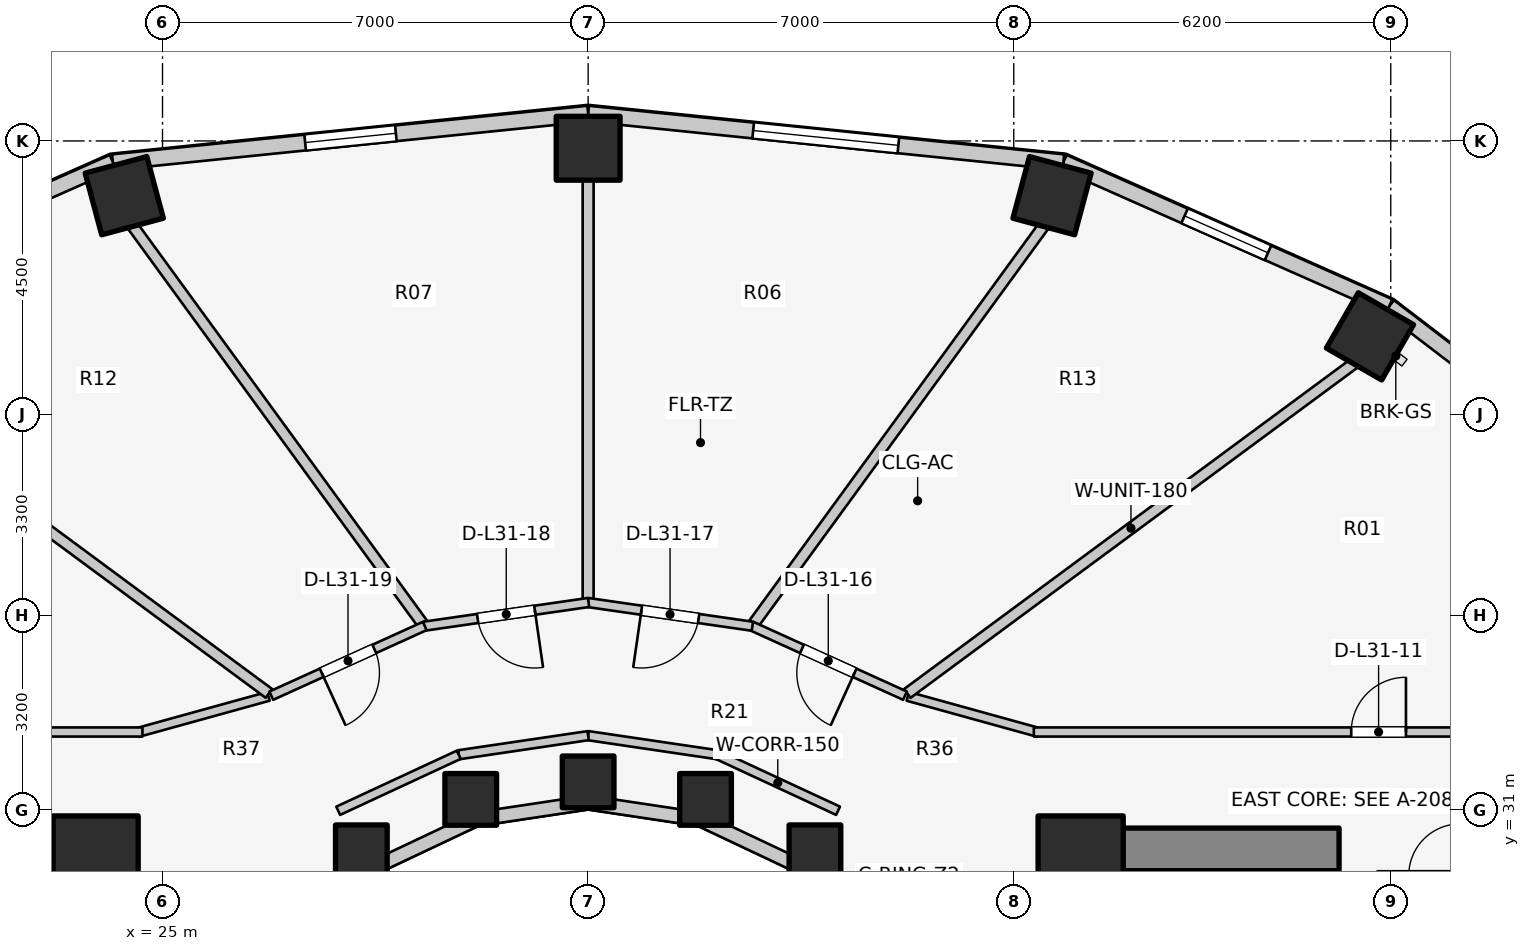
"""IFC4 building model, lengths in metres.
Left out: names, types, materials, properties, quantities, classifications, styles, units other than length and angle.
Written with IfcOpenShell. Run it as: python <this file> out.ifc"""

import sys

from ifc_helpers import new_model, si_unit, direction, frame, frame_2d, origin, origin_2d, place, context, subcontext, project, spatial, rectangle, extrude, element, fill, save


model = new_model("IFC4")
c1 = context("Model", 3, precision=1e-05, world=origin(), true_north=direction((0.0, 1.0)))
c2 = subcontext(c1, "Body", "Model", "MODEL_VIEW")
j1 = project(units=[si_unit("LENGTHUNIT", "METRE"), si_unit("PLANEANGLEUNIT", "RADIAN")], contexts=[c1])
p1 = place(None, origin())
s1 = spatial("IfcSite", under=j1, at=p1, CompositionType="ELEMENT")
p2 = place(p1, origin())
s2 = spatial("IfcBuilding", under=s1, at=p2, CompositionType="ELEMENT")
p3 = place(p2, frame((0.0, 0.0, 104.2)))
s3 = spatial("IfcBuildingStorey", under=s2, at=p3, CompositionType="ELEMENT", Elevation=104.2)
for number, where, z_axis, x_axis in (
    (1, (19.65, 30.35, 0.0), (0.0, 0.0, 1.0), (1.0, 0.0, 0.0)),
    (2, (39.85, 30.35, 0.0), (0.0, 0.0, 1.0), (1.0, 0.0, 0.0)),
):
    element("IfcWall", number, at=place(p3, frame(where, z_axis=z_axis, x_axis=x_axis)), inside=s3, PredefinedType="SHEAR", context=c2, shape_type="SweptSolid", body=[
        extrude(rectangle(XDim=4.5, YDim=0.7, at=frame_2d((2.25, 0.0))), origin(), (0.0, 0.0, 1.0), 3.1),
    ])
for number, where, z_axis, x_axis in (
    (3, (23.9, 30.2, 0.0), (0.0, 0.0, 1.0), (1.0, 0.0, 0.0)),
    (4, (40.1, 30.2, 0.0), (0.0, 0.0, 1.0), (1.0, 0.0, 0.0)),
):
    element("IfcColumn", number, at=place(p3, frame(where, z_axis=z_axis, x_axis=x_axis)), inside=s3, PredefinedType="COLUMN", context=c2, shape_type="SweptSolid", body=[
        extrude(rectangle(XDim=1.4, YDim=1.4, at=origin_2d()), origin(), (0.0, 0.0, 1.0), 3.1),
    ])
p4 = place(p3, frame((35.73, 30.327, 0.0), z_axis=(0.0, 0.0, 1.0), x_axis=(1.0, 0.0, 0.0)))
e5 = element("IfcColumn", 5, at=p4, inside=s3, PredefinedType="COLUMN", context=c2, shape_type="SweptSolid", body=[
    extrude(rectangle(XDim=0.85, YDim=0.85, at=origin_2d()), origin(), (0.0, 0.0, 1.0), 3.1),
])
p5 = place(p3, frame((44.858, 38.786, 0.0), z_axis=(0.0, 0.0, 1.0), x_axis=(0.5, 0.866025403784, 0.0)))
e6 = element("IfcColumn", 6, at=p5, inside=s3, PredefinedType="COLUMN", context=c2, shape_type="SweptSolid", body=[
    extrude(rectangle(XDim=1.05, YDim=1.05, at=origin_2d()), origin(), (0.0, 0.0, 1.0), 3.1),
])
p6 = place(p3, frame((33.931, 31.172, 0.0), z_axis=(0.0, 0.0, 1.0), x_axis=(1.0, 0.0, 0.0)))
e7 = element("IfcColumn", 7, at=p6, inside=s3, PredefinedType="COLUMN", context=c2, shape_type="SweptSolid", body=[
    extrude(rectangle(XDim=0.85, YDim=0.85, at=origin_2d()), origin(), (0.0, 0.0, 1.0), 3.1),
])
p7 = place(p3, frame((39.629, 41.1, 0.0), z_axis=(0.0, 0.0, 1.0), x_axis=(0.258819045103, 0.965925826289, 0.0)))
e8 = element("IfcColumn", 8, at=p7, inside=s3, PredefinedType="COLUMN", context=c2, shape_type="SweptSolid", body=[
    extrude(rectangle(XDim=1.05, YDim=1.05, at=origin_2d()), origin(), (0.0, 0.0, 1.0), 3.1),
])
p8 = place(p3, frame((32.0, 31.46, 0.0), z_axis=(0.0, 0.0, 1.0), x_axis=(1.0, 0.0, 0.0)))
e9 = element("IfcColumn", 9, at=p8, inside=s3, PredefinedType="COLUMN", context=c2, shape_type="SweptSolid", body=[
    extrude(rectangle(XDim=0.85, YDim=0.85, at=origin_2d()), origin(), (0.0, 0.0, 1.0), 3.1),
])
p9 = place(p3, frame((32.0, 41.88, 0.0), z_axis=(0.0, 0.0, 1.0), x_axis=(0.0, 1.0, 0.0)))
e10 = element("IfcColumn", 10, at=p9, inside=s3, PredefinedType="COLUMN", context=c2, shape_type="SweptSolid", body=[
    extrude(rectangle(XDim=1.05, YDim=1.05, at=origin_2d()), origin(), (0.0, 0.0, 1.0), 3.1),
])
p10 = place(p3, frame((30.069, 31.172, 0.0), z_axis=(0.0, 0.0, 1.0), x_axis=(1.0, 0.0, 0.0)))
e11 = element("IfcColumn", 11, at=p10, inside=s3, PredefinedType="COLUMN", context=c2, shape_type="SweptSolid", body=[
    extrude(rectangle(XDim=0.85, YDim=0.85, at=origin_2d()), origin(), (0.0, 0.0, 1.0), 3.1),
])
p11 = place(p3, frame((24.371, 41.1, 0.0), z_axis=(0.0, 0.0, 1.0), x_axis=(-0.258819045103, 0.965925826289, 0.0)))
e12 = element("IfcColumn", 12, at=p11, inside=s3, PredefinedType="COLUMN", context=c2, shape_type="SweptSolid", body=[
    extrude(rectangle(XDim=1.05, YDim=1.05, at=origin_2d()), origin(), (0.0, 0.0, 1.0), 3.1),
])
p12 = place(p3, frame((28.27, 30.327, 0.0), z_axis=(0.0, 0.0, 1.0), x_axis=(1.0, 0.0, 0.0)))
e13 = element("IfcColumn", 13, at=p12, inside=s3, PredefinedType="COLUMN", context=c2, shape_type="SweptSolid", body=[
    extrude(rectangle(XDim=0.85, YDim=0.85, at=origin_2d()), origin(), (0.0, 0.0, 1.0), 3.1),
])
p13 = place(p3, frame((37.035, 28.742, 0.0), z_axis=(0.0, 0.0, 1.0), x_axis=(-0.752576694707, 0.658504607869, 0.0)))
e14 = element("IfcWall", 14, at=p13, inside=s3, PredefinedType="STANDARD", context=c2, shape_type="SweptSolid", body=[
    extrude(rectangle(XDim=1.959, YDim=0.23, at=frame_2d((0.98, 0.0))), origin(), (0.0, 0.0, 1.0), 2.16),
])
p14 = place(p3, frame((35.56, 30.032, 0.0), z_axis=(0.0, 0.0, 1.0), x_axis=(-0.904179699603, 0.427152280606, 0.0)))
e15 = element("IfcWall", 15, at=p14, inside=s3, PredefinedType="STANDARD", context=c2, shape_type="SweptSolid", body=[
    extrude(rectangle(XDim=1.899, YDim=0.23, at=frame_2d((0.95, 0.0))), origin(), (0.0, 0.0, 1.0), 2.16),
])
for number, where, z_axis, x_axis in (
    (16, (33.843, 30.843, 0.0), (0.0, 0.0, 1.0), (-0.989, 0.149, 0.0)),
    (17, (32.0, 31.12, 0.0), (0.0, 0.0, 1.0), (-0.989, -0.149, 0.0)),
):
    element("IfcWall", number, at=place(p3, frame(where, z_axis=z_axis, x_axis=x_axis)), inside=s3, PredefinedType="STANDARD", context=c2, shape_type="SweptSolid", body=[
        extrude(rectangle(XDim=1.864, YDim=0.23, at=frame_2d((0.932, 0.0))), origin(), (0.0, 0.0, 1.0), 2.16),
    ])
p15 = place(p3, frame((30.157, 30.843, 0.0), z_axis=(0.0, 0.0, 1.0), x_axis=(-0.904179699603, -0.427152280606, 0.0)))
e18 = element("IfcWall", 18, at=p15, inside=s3, PredefinedType="STANDARD", context=c2, shape_type="SweptSolid", body=[
    extrude(rectangle(XDim=1.899, YDim=0.23, at=frame_2d((0.95, 0.0))), origin(), (0.0, 0.0, 1.0), 2.16),
])
p16 = place(p3, frame((28.44, 30.032, 0.0), z_axis=(0.0, 0.0, 1.0), x_axis=(-0.752576694707, -0.658504607869, 0.0)))
e19 = element("IfcWall", 19, at=p16, inside=s3, PredefinedType="STANDARD", context=c2, shape_type="SweptSolid", body=[
    extrude(rectangle(XDim=1.959, YDim=0.23, at=frame_2d((0.98, 0.0))), origin(), (0.0, 0.0, 1.0), 2.16),
])
p17 = place(p3, frame((49.266, 36.153, 0.0), z_axis=(0.0, 0.0, 1.0), x_axis=(-0.794809810864, 0.606858603427, 0.0)))
e20 = element("IfcWall", 20, at=p17, inside=s3, PredefinedType="STANDARD", context=c2, shape_type="SweptSolid", body=[
    extrude(rectangle(XDim=5.149, YDim=0.26, at=frame_2d((2.575, 0.0))), origin(), (0.0, 0.0, 1.0), 2.85),
])
p18 = place(p3, frame((45.173, 39.278, 0.0), z_axis=(0.0, 0.0, 1.0), x_axis=(-0.914336605747, 0.404955023911, 0.0)))
e21 = element("IfcWall", 21, at=p18, inside=s3, PredefinedType="STANDARD", context=c2, shape_type="SweptSolid", body=[
    extrude(rectangle(XDim=5.859, YDim=0.26, at=frame_2d((2.929, 0.0))), origin(), (0.0, 0.0, 1.0), 2.85),
])
p19 = place(p18, frame((2.179, 0.0, 0.75)))
e22 = element("IfcOpeningElement", 22, at=p19, cuts=e21, PredefinedType="OPENING", context=c2, shape_type="SweptSolid", body=[
    extrude(rectangle(XDim=1.5, YDim=1.6, at=frame_2d((0.75, 0.8))), frame((0.0, 0.14, 0.0), z_axis=(0.0, -1.0, 0.0), x_axis=(1.0, 0.0, 0.0)), (0.0, 0.0, 1.0), 0.28),
])
p20 = place(p3, frame((39.816, 41.651, 0.0), z_axis=(0.0, 0.0, 1.0), x_axis=(-0.994821390558, 0.101638579726, 0.0)))
e23 = element("IfcWall", 23, at=p20, inside=s3, PredefinedType="STANDARD", context=c2, shape_type="SweptSolid", body=[
    extrude(rectangle(XDim=7.857, YDim=0.26, at=frame_2d((3.929, 0.0))), origin(), (0.0, 0.0, 1.0), 2.85),
])
p21 = place(p20, frame((2.729, 0.0, 0.75)))
e24 = element("IfcOpeningElement", 24, at=p21, cuts=e23, PredefinedType="OPENING", context=c2, shape_type="SweptSolid", body=[
    extrude(rectangle(XDim=2.4, YDim=1.7, at=frame_2d((1.2, 0.85))), frame((0.0, 0.14, 0.0), z_axis=(0.0, -1.0, 0.0), x_axis=(1.0, 0.0, 0.0)), (0.0, 0.0, 1.0), 0.28),
])
p22 = place(p3, frame((32.0, 42.449, 0.0), z_axis=(0.0, 0.0, 1.0), x_axis=(-0.994821390558, -0.101638579726, 0.0)))
e25 = element("IfcWall", 25, at=p22, inside=s3, PredefinedType="STANDARD", context=c2, shape_type="SweptSolid", body=[
    extrude(rectangle(XDim=7.857, YDim=0.26, at=frame_2d((3.929, 0.0))), origin(), (0.0, 0.0, 1.0), 2.85),
])
p23 = place(p22, frame((3.178, 0.0, 0.75)))
e26 = element("IfcOpeningElement", 26, at=p23, cuts=e25, PredefinedType="OPENING", context=c2, shape_type="SweptSolid", body=[
    extrude(rectangle(XDim=1.5, YDim=1.6, at=frame_2d((0.75, 0.8))), frame((0.0, 0.14, 0.0), z_axis=(0.0, -1.0, 0.0), x_axis=(1.0, 0.0, 0.0)), (0.0, 0.0, 1.0), 0.28),
])
p24 = place(p3, frame((24.184, 41.651, 0.0), z_axis=(0.0, 0.0, 1.0), x_axis=(-0.914336605747, -0.404955023911, 0.0)))
e27 = element("IfcWall", 27, at=p24, inside=s3, PredefinedType="STANDARD", context=c2, shape_type="SweptSolid", body=[
    extrude(rectangle(XDim=5.859, YDim=0.26, at=frame_2d((2.929, 0.0))), origin(), (0.0, 0.0, 1.0), 2.85),
])
p25 = place(p24, frame((2.179, 0.0, 0.75)))
e28 = element("IfcOpeningElement", 28, at=p25, cuts=e27, PredefinedType="OPENING", context=c2, shape_type="SweptSolid", body=[
    extrude(rectangle(XDim=1.5, YDim=1.6, at=frame_2d((0.75, 0.8))), frame((0.0, 0.14, 0.0), z_axis=(0.0, -1.0, 0.0), x_axis=(1.0, 0.0, 0.0)), (0.0, 0.0, 1.0), 0.28),
])
p26 = place(p3, frame((36.11, 30.985, 0.0), z_axis=(0.0, 0.0, 1.0), x_axis=(-0.906943449489, 0.421252393975, 0.0)))
e29 = element("IfcWall", 29, at=p26, inside=s3, PredefinedType="PARTITIONING", context=c2, shape_type="SweptSolid", body=[
    extrude(rectangle(XDim=2.186, YDim=0.15, at=frame_2d((1.093, 0.0))), origin(), (0.0, 0.0, 1.0), 2.272),
])
for number, where, z_axis, x_axis in (
    (30, (34.127, 31.906, 0.0), (0.0, 0.0, 1.0), (-0.989, 0.146, 0.0)),
    (31, (32.0, 32.22, 0.0), (0.0, 0.0, 1.0), (-0.989, -0.146, 0.0)),
):
    element("IfcWall", number, at=place(p3, frame(where, z_axis=z_axis, x_axis=x_axis)), inside=s3, PredefinedType="PARTITIONING", context=c2, shape_type="SweptSolid", body=[
        extrude(rectangle(XDim=2.151, YDim=0.15, at=frame_2d((1.075, 0.0))), origin(), (0.0, 0.0, 1.0), 2.272),
    ])
p27 = place(p3, frame((29.873, 31.906, 0.0), z_axis=(0.0, 0.0, 1.0), x_axis=(-0.906943449489, -0.421252393975, 0.0)))
e32 = element("IfcWall", 32, at=p27, inside=s3, PredefinedType="PARTITIONING", context=c2, shape_type="SweptSolid", body=[
    extrude(rectangle(XDim=2.186, YDim=0.15, at=frame_2d((1.093, 0.0))), origin(), (0.0, 0.0, 1.0), 2.272),
])
p28 = place(p3, frame((37.258, 32.867, 0.0), z_axis=(0.0, 0.0, 1.0), x_axis=(0.963833843713, -0.266503886865, 0.0)))
e33 = element("IfcWall", 33, at=p28, inside=s3, PredefinedType="PARTITIONING", context=c2, shape_type="SweptSolid", body=[
    extrude(rectangle(XDim=2.232, YDim=0.15, at=frame_2d((1.116, 0.0))), origin(), (0.0, 0.0, 1.0), 2.272),
])
p29 = place(p3, frame((39.33, 32.28, 0.0), z_axis=(0.0, 0.0, 1.0), x_axis=(1.0, 0.0, 0.0)))
e34 = element("IfcWall", 34, at=p29, inside=s3, PredefinedType="PARTITIONING", context=c2, shape_type="SweptSolid", body=[
    extrude(rectangle(XDim=7.52, YDim=0.15, at=frame_2d((3.76, 0.0))), origin(), (0.0, 0.0, 1.0), 2.272),
])
p30 = place(p29, frame((5.22, 0.0, 0.0)))
e35 = element("IfcOpeningElement", 35, at=p30, cuts=e34, PredefinedType="OPENING", context=c2, shape_type="SweptSolid", body=[
    extrude(rectangle(XDim=0.9, YDim=2.1, at=frame_2d((0.45, 1.05))), frame((0.0, 0.085, 0.0), z_axis=(0.0, -1.0, 0.0), x_axis=(1.0, 0.0, 0.0)), (0.0, 0.0, 1.0), 0.17),
])
p31 = place(p3, frame((26.742, 32.867, 0.0), z_axis=(0.0, 0.0, 1.0), x_axis=(-0.963833843713, -0.266503886865, 0.0)))
e36 = element("IfcWall", 36, at=p31, inside=s3, PredefinedType="PARTITIONING", context=c2, shape_type="SweptSolid", body=[
    extrude(rectangle(XDim=2.232, YDim=0.15, at=frame_2d((1.116, 0.0))), origin(), (0.0, 0.0, 1.0), 2.272),
])
p32 = place(p3, frame((17.15, 32.28, 0.0), z_axis=(0.0, 0.0, 1.0), x_axis=(1.0, 0.0, 0.0)))
e37 = element("IfcWall", 37, at=p32, inside=s3, PredefinedType="PARTITIONING", context=c2, shape_type="SweptSolid", body=[
    extrude(rectangle(XDim=7.52, YDim=0.15, at=frame_2d((3.76, 0.0))), origin(), (0.0, 0.0, 1.0), 2.272),
])
p33 = place(p32, frame((1.3, 0.0, 0.0)))
e38 = element("IfcOpeningElement", 38, at=p33, cuts=e37, PredefinedType="OPENING", context=c2, shape_type="SweptSolid", body=[
    extrude(rectangle(XDim=0.9, YDim=2.1, at=frame_2d((0.45, 1.05))), frame((0.0, 0.085, 0.0), z_axis=(0.0, -1.0, 0.0), x_axis=(1.0, 0.0, 0.0)), (0.0, 0.0, 1.0), 0.17),
])
p34 = place(p3, frame((37.249, 32.914, 0.0), z_axis=(0.0, 0.0, 1.0), x_axis=(0.80430981394, 0.594210167533, 0.0)))
e39 = element("IfcWall", 39, at=p34, inside=s3, PredefinedType="PARTITIONING", context=c2, shape_type="SweptSolid", body=[
    extrude(rectangle(XDim=9.146, YDim=0.18, at=frame_2d((4.573, 0.0))), origin(), (0.0, 0.0, 1.0), 2.272),
])
p35 = place(p3, frame((34.727, 34.066, 0.0), z_axis=(0.0, 0.0, 1.0), x_axis=(0.589042211476, 0.808102266486, 0.0)))
e40 = element("IfcWall", 40, at=p35, inside=s3, PredefinedType="PARTITIONING", context=c2, shape_type="SweptSolid", body=[
    extrude(rectangle(XDim=8.101, YDim=0.18, at=frame_2d((4.051, 0.0))), origin(), (0.0, 0.0, 1.0), 2.272),
])
p36 = place(p3, frame((32.0, 34.465, 0.0), z_axis=(0.0, 0.0, 1.0), x_axis=(0.0, 1.0, 0.0)))
e41 = element("IfcWall", 41, at=p36, inside=s3, PredefinedType="PARTITIONING", context=c2, shape_type="SweptSolid", body=[
    extrude(rectangle(XDim=6.91, YDim=0.18, at=frame_2d((3.455, 0.0))), origin(), (0.0, 0.0, 1.0), 2.272),
])
p37 = place(p3, frame((29.273, 34.066, 0.0), z_axis=(0.0, 0.0, 1.0), x_axis=(-0.589042211476, 0.808102266486, 0.0)))
e42 = element("IfcWall", 42, at=p37, inside=s3, PredefinedType="PARTITIONING", context=c2, shape_type="SweptSolid", body=[
    extrude(rectangle(XDim=8.101, YDim=0.18, at=frame_2d((4.051, 0.0))), origin(), (0.0, 0.0, 1.0), 2.272),
])
p38 = place(p3, frame((26.751, 32.914, 0.0), z_axis=(0.0, 0.0, 1.0), x_axis=(-0.80430981394, 0.594210167533, 0.0)))
e43 = element("IfcWall", 43, at=p38, inside=s3, PredefinedType="PARTITIONING", context=c2, shape_type="SweptSolid", body=[
    extrude(rectangle(XDim=9.146, YDim=0.18, at=frame_2d((4.573, 0.0))), origin(), (0.0, 0.0, 1.0), 2.272),
])
p39 = place(p3, frame((37.211, 32.877, 0.0), z_axis=(0.0, 0.0, 1.0), x_axis=(-0.910568469686, 0.41335827319, 0.0)))
e44 = element("IfcWall", 44, at=p39, inside=s3, PredefinedType="PARTITIONING", context=c2, shape_type="SweptSolid", body=[
    extrude(rectangle(XDim=2.772, YDim=0.15, at=frame_2d((1.386, 0.0))), origin(), (0.0, 0.0, 1.0), 2.272),
])
p40 = place(p39, frame((0.911, 0.0, 0.0)))
e45 = element("IfcOpeningElement", 45, at=p40, cuts=e44, PredefinedType="OPENING", context=c2, shape_type="SweptSolid", body=[
    extrude(rectangle(XDim=0.95, YDim=2.1, at=frame_2d((0.475, 1.05))), frame((0.0, 0.085, 0.0), z_axis=(0.0, -1.0, 0.0), x_axis=(1.0, 0.0, 0.0)), (0.0, 0.0, 1.0), 0.17),
])
p41 = place(p3, frame((34.701, 34.019, 0.0), z_axis=(0.0, 0.0, 1.0), x_axis=(-0.989748682384, 0.142819976611, 0.0)))
e46 = element("IfcWall", 46, at=p41, inside=s3, PredefinedType="PARTITIONING", context=c2, shape_type="SweptSolid", body=[
    extrude(rectangle(XDim=2.737, YDim=0.15, at=frame_2d((1.368, 0.0))), origin(), (0.0, 0.0, 1.0), 2.272),
])
p42 = place(p41, frame((0.893, 0.0, 0.0)))
e47 = element("IfcOpeningElement", 47, at=p42, cuts=e46, PredefinedType="OPENING", context=c2, shape_type="SweptSolid", body=[
    extrude(rectangle(XDim=0.95, YDim=2.1, at=frame_2d((0.475, 1.05))), frame((0.0, 0.085, 0.0), z_axis=(0.0, -1.0, 0.0), x_axis=(1.0, 0.0, 0.0)), (0.0, 0.0, 1.0), 0.17),
])
p43 = place(p3, frame((32.007, 34.41, 0.0), z_axis=(0.0, 0.0, 1.0), x_axis=(-0.989748682384, -0.142819976611, 0.0)))
e48 = element("IfcWall", 48, at=p43, inside=s3, PredefinedType="PARTITIONING", context=c2, shape_type="SweptSolid", body=[
    extrude(rectangle(XDim=2.737, YDim=0.15, at=frame_2d((1.368, 0.0))), origin(), (0.0, 0.0, 1.0), 2.272),
])
p44 = place(p43, frame((0.893, 0.0, 0.0)))
e49 = element("IfcOpeningElement", 49, at=p44, cuts=e48, PredefinedType="OPENING", context=c2, shape_type="SweptSolid", body=[
    extrude(rectangle(XDim=0.95, YDim=2.1, at=frame_2d((0.475, 1.05))), frame((0.0, 0.085, 0.0), z_axis=(0.0, -1.0, 0.0), x_axis=(1.0, 0.0, 0.0)), (0.0, 0.0, 1.0), 0.17),
])
p45 = place(p3, frame((29.313, 34.023, 0.0), z_axis=(0.0, 0.0, 1.0), x_axis=(-0.910568469686, -0.41335827319, 0.0)))
e50 = element("IfcWall", 50, at=p45, inside=s3, PredefinedType="PARTITIONING", context=c2, shape_type="SweptSolid", body=[
    extrude(rectangle(XDim=2.772, YDim=0.15, at=frame_2d((1.386, 0.0))), origin(), (0.0, 0.0, 1.0), 2.272),
])
p46 = place(p45, frame((0.911, 0.0, 0.0)))
e51 = element("IfcOpeningElement", 51, at=p46, cuts=e50, PredefinedType="OPENING", context=c2, shape_type="SweptSolid", body=[
    extrude(rectangle(XDim=0.95, YDim=2.1, at=frame_2d((0.475, 1.05))), frame((0.0, 0.085, 0.0), z_axis=(0.0, -1.0, 0.0), x_axis=(1.0, 0.0, 0.0)), (0.0, 0.0, 1.0), 0.17),
])
p47 = place(p19, origin())
e52 = element("IfcWindow", 52, at=p47, inside=s3, PartitioningType="SINGLE_PANEL", PredefinedType="WINDOW", context=c2, shape_type="SweptSolid", body=[
    extrude(rectangle(XDim=1.5, YDim=1.6, at=frame_2d((0.75, 0.8))), frame((0.0, 0.03, 0.0), z_axis=(0.0, -1.0, 0.0), x_axis=(1.0, 0.0, 0.0)), (0.0, 0.0, 1.0), 0.06),
])
fill(e22, e52)
p48 = place(p21, origin())
e53 = element("IfcWindow", 53, at=p48, inside=s3, PartitioningType="SINGLE_PANEL", PredefinedType="WINDOW", context=c2, shape_type="SweptSolid", body=[
    extrude(rectangle(XDim=2.4, YDim=1.7, at=frame_2d((1.2, 0.85))), frame((0.0, 0.03, 0.0), z_axis=(0.0, -1.0, 0.0), x_axis=(1.0, 0.0, 0.0)), (0.0, 0.0, 1.0), 0.06),
])
fill(e24, e53)
p49 = place(p23, origin())
e54 = element("IfcWindow", 54, at=p49, inside=s3, PartitioningType="SINGLE_PANEL", PredefinedType="WINDOW", context=c2, shape_type="SweptSolid", body=[
    extrude(rectangle(XDim=1.5, YDim=1.6, at=frame_2d((0.75, 0.8))), frame((0.0, 0.03, 0.0), z_axis=(0.0, -1.0, 0.0), x_axis=(1.0, 0.0, 0.0)), (0.0, 0.0, 1.0), 0.06),
])
fill(e26, e54)
p50 = place(p30, origin())
e55 = element("IfcDoor", 55, at=p50, inside=s3, OperationType="SINGLE_SWING_RIGHT", PredefinedType="DOOR", context=c2, shape_type="SweptSolid", body=[
    extrude(rectangle(XDim=0.9, YDim=2.1, at=frame_2d((0.45, 1.05))), frame((0.0, 0.025, 0.0), z_axis=(0.0, -1.0, 0.0), x_axis=(1.0, 0.0, 0.0)), (0.0, 0.0, 1.0), 0.05),
])
fill(e35, e55)
p51 = place(p40, origin())
e56 = element("IfcDoor", 56, at=p51, inside=s3, OperationType="SINGLE_SWING_LEFT", PredefinedType="DOOR", context=c2, shape_type="SweptSolid", body=[
    extrude(rectangle(XDim=0.95, YDim=2.1, at=frame_2d((0.475, 1.05))), frame((0.0, 0.025, 0.0), z_axis=(0.0, -1.0, 0.0), x_axis=(1.0, 0.0, 0.0)), (0.0, 0.0, 1.0), 0.05),
])
fill(e45, e56)
p52 = place(p42, origin())
e57 = element("IfcDoor", 57, at=p52, inside=s3, OperationType="SINGLE_SWING_RIGHT", PredefinedType="DOOR", context=c2, shape_type="SweptSolid", body=[
    extrude(rectangle(XDim=0.95, YDim=2.1, at=frame_2d((0.475, 1.05))), frame((0.0, 0.025, 0.0), z_axis=(0.0, -1.0, 0.0), x_axis=(1.0, 0.0, 0.0)), (0.0, 0.0, 1.0), 0.05),
])
fill(e47, e57)
p53 = place(p44, origin())
e58 = element("IfcDoor", 58, at=p53, inside=s3, OperationType="SINGLE_SWING_LEFT", PredefinedType="DOOR", context=c2, shape_type="SweptSolid", body=[
    extrude(rectangle(XDim=0.95, YDim=2.1, at=frame_2d((0.475, 1.05))), frame((0.0, 0.025, 0.0), z_axis=(0.0, -1.0, 0.0), x_axis=(1.0, 0.0, 0.0)), (0.0, 0.0, 1.0), 0.05),
])
fill(e49, e58)
p54 = place(p46, origin())
e59 = element("IfcDoor", 59, at=p54, inside=s3, OperationType="SINGLE_SWING_RIGHT", PredefinedType="DOOR", context=c2, shape_type="SweptSolid", body=[
    extrude(rectangle(XDim=0.95, YDim=2.1, at=frame_2d((0.475, 1.05))), frame((0.0, 0.025, 0.0), z_axis=(0.0, -1.0, 0.0), x_axis=(1.0, 0.0, 0.0)), (0.0, 0.0, 1.0), 0.05),
])
fill(e51, e59)
save(model, sys.argv[1])
